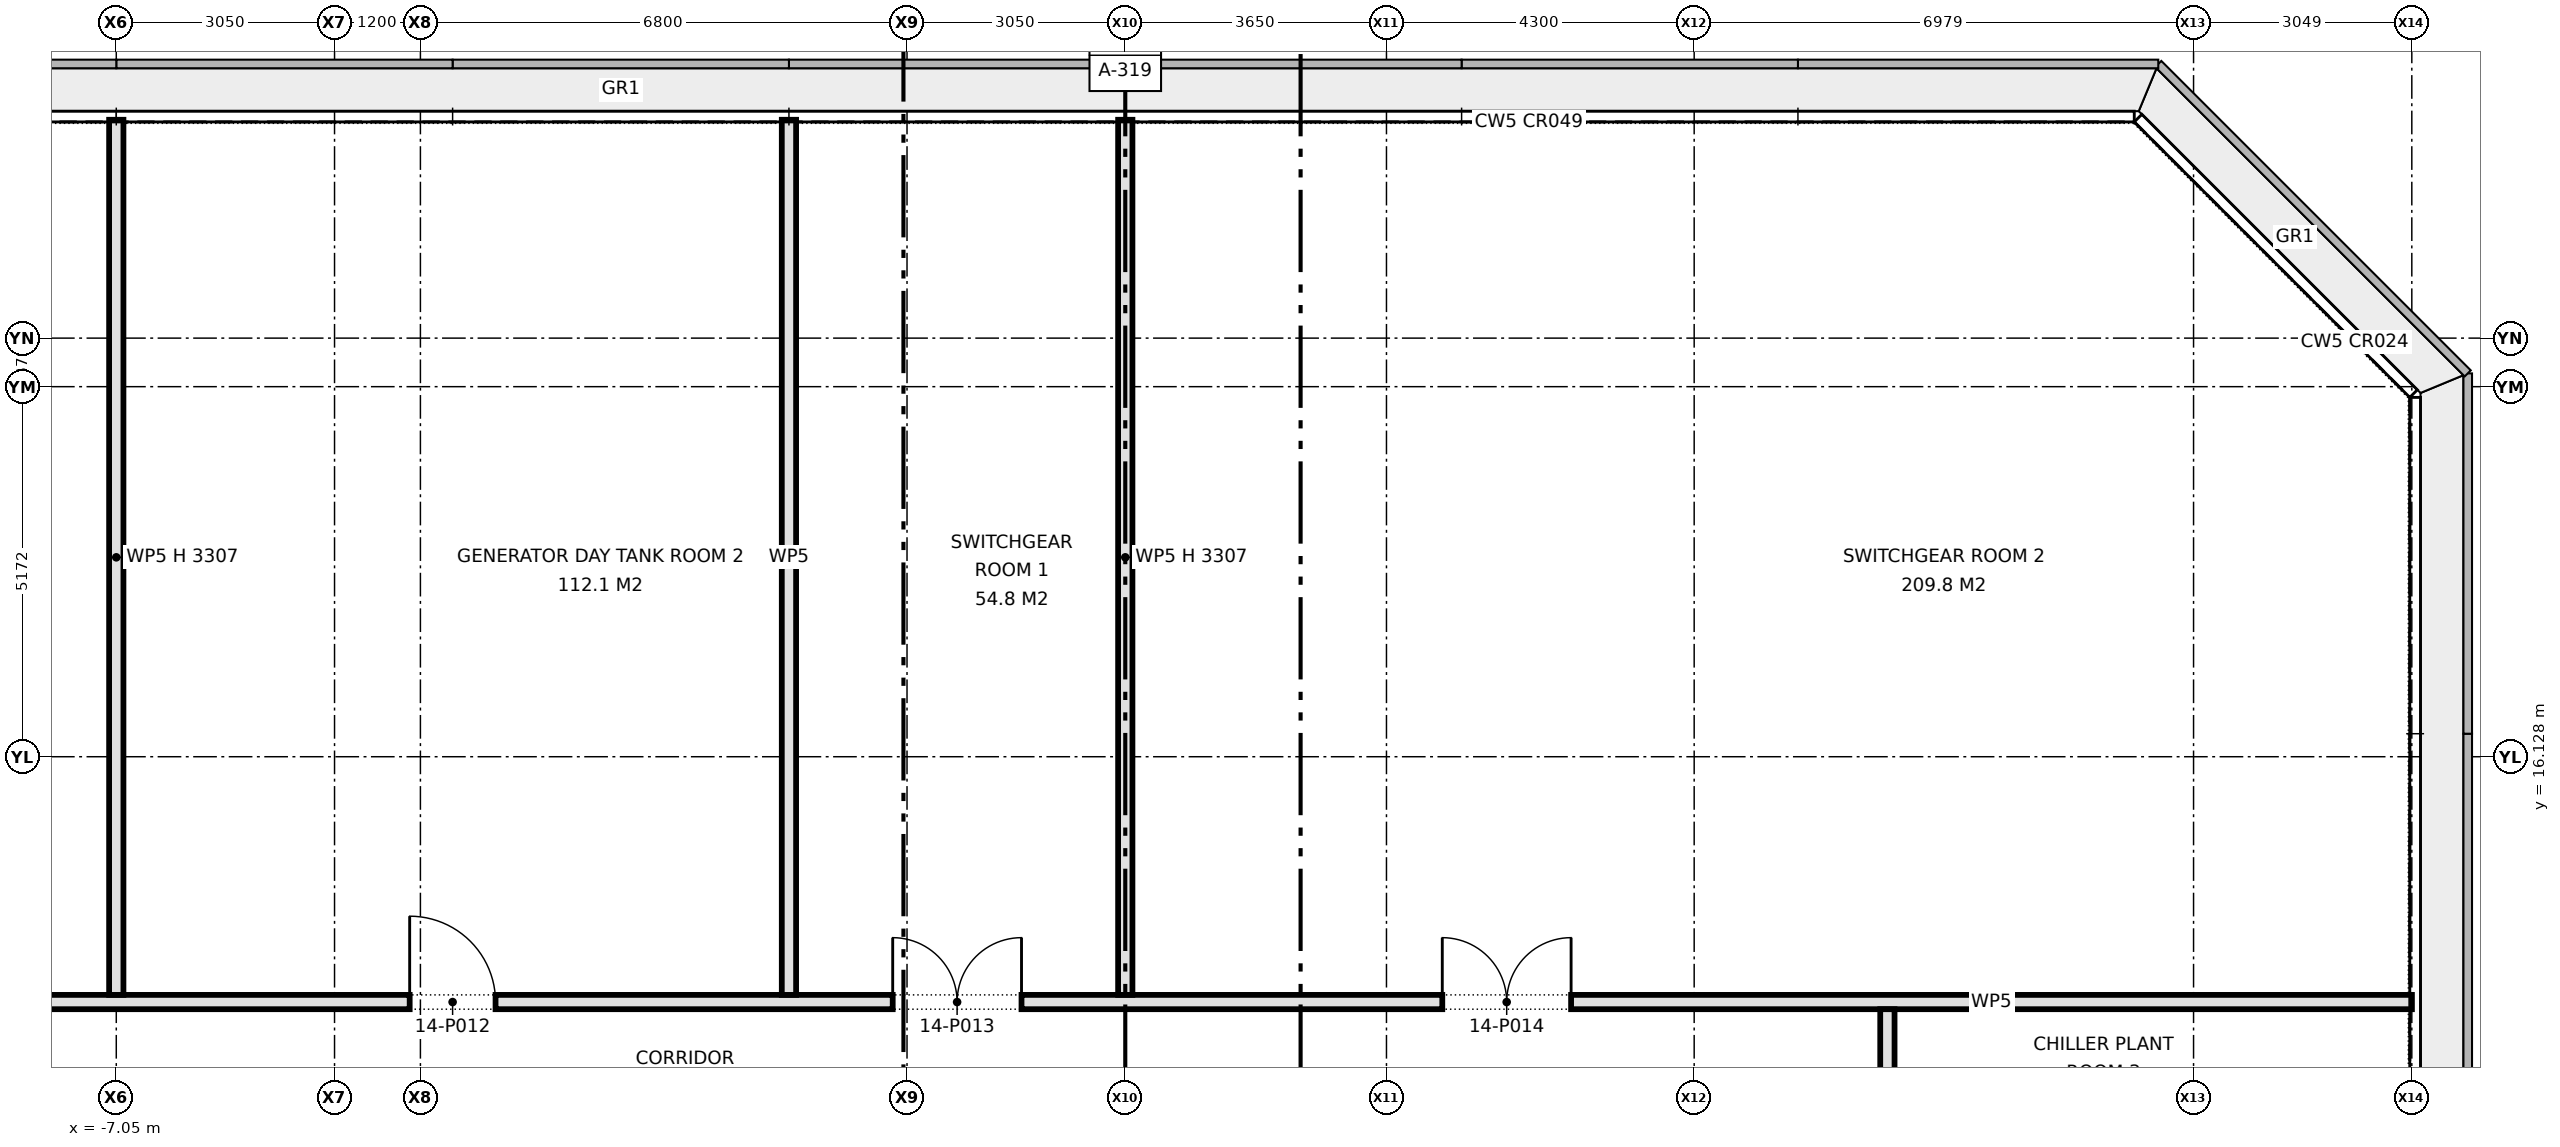
"""IFC4 building model, lengths in metres.
Left out: names, types, materials, properties, quantities, classifications, styles, units other than length and angle.
Written with IfcOpenShell. Run it as: python <this file> out.ifc"""

import sys

from ifc_helpers import new_model, si_unit, direction, frame, frame_2d, origin, place, context, subcontext, project, spatial, rectangle, extrude, element, fill, save


model = new_model("IFC4")
c1 = context("Model", 3, precision=1e-05, world=origin(), true_north=direction((0.0, 1.0)))
c2 = subcontext(c1, "Body", "Model", "MODEL_VIEW")
j1 = project(units=[si_unit("LENGTHUNIT", "METRE"), si_unit("PLANEANGLEUNIT", "RADIAN")], contexts=[c1])
p1 = place(None, origin())
s1 = spatial("IfcSite", under=j1, at=p1, CompositionType="ELEMENT")
p2 = place(p1, origin())
s2 = spatial("IfcBuilding", under=s1, at=p2, CompositionType="ELEMENT")
p3 = place(p2, frame((0.0, 0.0, 64.1)))
s3 = spatial("IfcBuildingStorey", under=s2, at=p3, CompositionType="ELEMENT", Elevation=64.1)
p4 = place(p3, frame((-25.03, 12.7, 0.0), z_axis=(0.0, 0.0, 1.0), x_axis=(1.0, 0.0, 0.0)))
e1 = element("IfcWall", 1, at=p4, inside=s3, PredefinedType="PARTITIONING", context=c2, shape_type="SweptSolid", body=[
    extrude(rectangle(XDim=50.06, YDim=0.2, at=frame_2d((25.03, 0.0))), origin(), (0.0, 0.0, 1.0), 4.3),
])
p5 = place(p4, frame((10.305, 0.0, 0.0)))
e2 = element("IfcOpeningElement", 2, at=p5, cuts=e1, PredefinedType="OPENING", context=c2, shape_type="SweptSolid", body=[
    extrude(rectangle(XDim=1.8, YDim=2.1, at=frame_2d((0.9, 1.05))), frame((0.0, 0.11, 0.0), z_axis=(0.0, -1.0, 0.0), x_axis=(1.0, 0.0, 0.0)), (0.0, 0.0, 1.0), 0.22),
])
p6 = place(p4, frame((15.03, 0.0, 0.0)))
e3 = element("IfcOpeningElement", 3, at=p6, cuts=e1, PredefinedType="OPENING", context=c2, shape_type="SweptSolid", body=[
    extrude(rectangle(XDim=1.2, YDim=2.1, at=frame_2d((0.6, 1.05))), frame((0.0, 0.11, 0.0), z_axis=(0.0, -1.0, 0.0), x_axis=(1.0, 0.0, 0.0)), (0.0, 0.0, 1.0), 0.22),
])
p7 = place(p4, frame((22.08, 0.0, 0.0)))
e4 = element("IfcOpeningElement", 4, at=p7, cuts=e1, PredefinedType="OPENING", context=c2, shape_type="SweptSolid", body=[
    extrude(rectangle(XDim=1.2, YDim=2.1, at=frame_2d((0.6, 1.05))), frame((0.0, 0.11, 0.0), z_axis=(0.0, -1.0, 0.0), x_axis=(1.0, 0.0, 0.0)), (0.0, 0.0, 1.0), 0.22),
])
p8 = place(p4, frame((28.83, 0.0, 0.0)))
e5 = element("IfcOpeningElement", 5, at=p8, cuts=e1, PredefinedType="OPENING", context=c2, shape_type="SweptSolid", body=[
    extrude(rectangle(XDim=1.8, YDim=2.1, at=frame_2d((0.9, 1.05))), frame((0.0, 0.11, 0.0), z_axis=(0.0, -1.0, 0.0), x_axis=(1.0, 0.0, 0.0)), (0.0, 0.0, 1.0), 0.22),
])
p9 = place(p4, frame((36.51, 0.0, 0.0)))
e6 = element("IfcOpeningElement", 6, at=p9, cuts=e1, PredefinedType="OPENING", context=c2, shape_type="SweptSolid", body=[
    extrude(rectangle(XDim=1.8, YDim=2.1, at=frame_2d((0.9, 1.05))), frame((0.0, 0.11, 0.0), z_axis=(0.0, -1.0, 0.0), x_axis=(1.0, 0.0, 0.0)), (0.0, 0.0, 1.0), 0.22),
])
p10 = place(p3, frame((17.7, -12.6, 0.0), z_axis=(0.0, 0.0, 1.0), x_axis=(0.0, 1.0, 0.0)))
e7 = element("IfcWall", 7, at=p10, inside=s3, PredefinedType="PARTITIONING", context=c2, shape_type="SweptSolid", body=[
    extrude(rectangle(XDim=25.2, YDim=0.2, at=frame_2d((12.6, 0.0))), origin(), (0.0, 0.0, 1.0), 4.3),
])
p11 = place(p10, frame((2.475, 0.0, 0.0)))
e8 = element("IfcOpeningElement", 8, at=p11, cuts=e7, PredefinedType="OPENING", context=c2, shape_type="SweptSolid", body=[
    extrude(rectangle(XDim=1.2, YDim=2.1, at=frame_2d((0.6, 1.05))), frame((0.0, 0.11, 0.0), z_axis=(0.0, -1.0, 0.0), x_axis=(1.0, 0.0, 0.0)), (0.0, 0.0, 1.0), 0.22),
])
p12 = place(p10, frame((9.65, 0.0, 0.0)))
e9 = element("IfcOpeningElement", 9, at=p12, cuts=e7, PredefinedType="OPENING", context=c2, shape_type="SweptSolid", body=[
    extrude(rectangle(XDim=1.2, YDim=2.1, at=frame_2d((0.6, 1.05))), frame((0.0, 0.11, 0.0), z_axis=(0.0, -1.0, 0.0), x_axis=(1.0, 0.0, 0.0)), (0.0, 0.0, 1.0), 0.22),
])
p13 = place(p10, frame((16.4, 0.0, 0.0)))
e10 = element("IfcOpeningElement", 10, at=p13, cuts=e7, PredefinedType="OPENING", context=c2, shape_type="SweptSolid", body=[
    extrude(rectangle(XDim=1.8, YDim=2.1, at=frame_2d((0.9, 1.05))), frame((0.0, 0.11, 0.0), z_axis=(0.0, -1.0, 0.0), x_axis=(1.0, 0.0, 0.0)), (0.0, 0.0, 1.0), 0.22),
])
p14 = place(p10, frame((20.525, 0.0, 0.0)))
e11 = element("IfcOpeningElement", 11, at=p14, cuts=e7, PredefinedType="OPENING", context=c2, shape_type="SweptSolid", body=[
    extrude(rectangle(XDim=1.8, YDim=2.1, at=frame_2d((0.9, 1.05))), frame((0.0, 0.11, 0.0), z_axis=(0.0, -1.0, 0.0), x_axis=(1.0, 0.0, 0.0)), (0.0, 0.0, 1.0), 0.22),
])
p15 = place(p3, frame((7.05, 12.8, 0.0), z_axis=(0.0, 0.0, 1.0), x_axis=(0.0, 1.0, 0.0)))
e12 = element("IfcWall", 12, at=p15, inside=s3, PredefinedType="PARTITIONING", context=c2, shape_type="SweptSolid", body=[
    extrude(rectangle(XDim=12.23, YDim=0.2, at=frame_2d((6.115, 0.0))), origin(), (0.0, 0.0, 1.0), 3.307),
])
p16 = place(p3, frame((2.35, 12.8, 0.0), z_axis=(0.0, 0.0, 1.0), x_axis=(0.0, 1.0, 0.0)))
e13 = element("IfcWall", 13, at=p16, inside=s3, PredefinedType="PARTITIONING", context=c2, shape_type="SweptSolid", body=[
    extrude(rectangle(XDim=12.23, YDim=0.2, at=frame_2d((6.115, 0.0))), origin(), (0.0, 0.0, 1.0), 4.3),
])
p17 = place(p3, frame((-7.05, 12.8, 0.0), z_axis=(0.0, 0.0, 1.0), x_axis=(0.0, 1.0, 0.0)))
e14 = element("IfcWall", 14, at=p17, inside=s3, PredefinedType="PARTITIONING", context=c2, shape_type="SweptSolid", body=[
    extrude(rectangle(XDim=12.23, YDim=0.2, at=frame_2d((6.115, 0.0))), origin(), (0.0, 0.0, 1.0), 3.307),
])
p18 = place(p7, origin())
e15 = element("IfcDoor", 15, at=p18, inside=s3, OperationType="SINGLE_SWING_LEFT", PredefinedType="DOOR", context=c2, shape_type="SweptSolid", body=[
    extrude(rectangle(XDim=1.2, YDim=2.1, at=frame_2d((0.6, 1.05))), frame((0.0, 0.025, 0.0), z_axis=(0.0, -1.0, 0.0), x_axis=(1.0, 0.0, 0.0)), (0.0, 0.0, 1.0), 0.05),
])
fill(e4, e15)
p19 = place(p8, origin())
e16 = element("IfcDoor", 16, at=p19, inside=s3, OperationType="DOUBLE_DOOR_SINGLE_SWING", PredefinedType="DOOR", context=c2, shape_type="SweptSolid", body=[
    extrude(rectangle(XDim=1.8, YDim=2.1, at=frame_2d((0.9, 1.05))), frame((0.0, 0.025, 0.0), z_axis=(0.0, -1.0, 0.0), x_axis=(1.0, 0.0, 0.0)), (0.0, 0.0, 1.0), 0.05),
])
fill(e5, e16)
p20 = place(p9, origin())
e17 = element("IfcDoor", 17, at=p20, inside=s3, OperationType="DOUBLE_DOOR_SINGLE_SWING", PredefinedType="DOOR", context=c2, shape_type="SweptSolid", body=[
    extrude(rectangle(XDim=1.8, YDim=2.1, at=frame_2d((0.9, 1.05))), frame((0.0, 0.025, 0.0), z_axis=(0.0, -1.0, 0.0), x_axis=(1.0, 0.0, 0.0)), (0.0, 0.0, 1.0), 0.05),
])
fill(e6, e17)
save(model, sys.argv[1])
